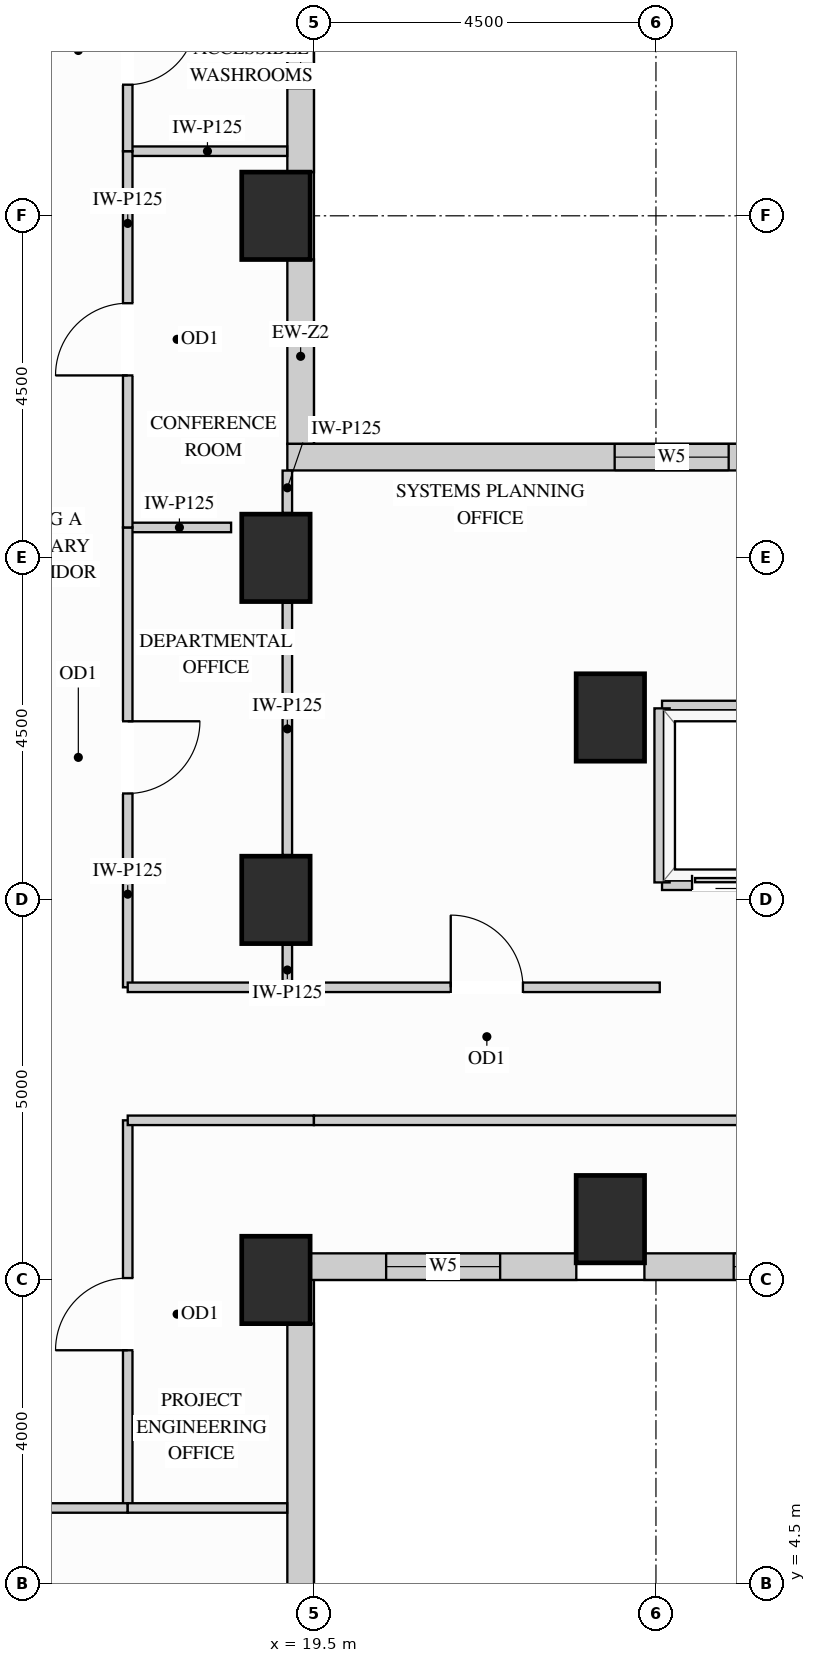
"""IFC4 building model, lengths in metres.
Left out: names, types, materials, properties, quantities, classifications, styles, units other than length and angle.
Written with IfcOpenShell. Run it as: python <this file> out.ifc"""

import sys

from ifc_helpers import new_model, si_unit, direction, frame, frame_2d, origin, origin_2d, place, context, subcontext, project, spatial, rectangle, extrude, source, transform, mapped, element, fill, save


model = new_model("IFC4")
c1 = context("Model", 3, precision=1e-05, world=origin(), true_north=direction((0.0, 1.0)))
c2 = subcontext(c1, "Body", "Model", "MODEL_VIEW")
j1 = project(units=[si_unit("LENGTHUNIT", "METRE"), si_unit("PLANEANGLEUNIT", "RADIAN")], contexts=[c1])
p1 = place(None, origin())
s1 = spatial("IfcSite", under=j1, at=p1, CompositionType="ELEMENT")
p2 = place(p1, origin())
s2 = spatial("IfcBuilding", under=s1, at=p2, CompositionType="ELEMENT")
p3 = place(p2, frame((0.0, 0.0, 131.4)))
s3 = spatial("IfcBuildingStorey", under=s2, at=p3, CompositionType="ELEMENT", Elevation=131.4)
m1 = source(origin(), c2, "Body", "SweptSolid", [
    extrude(rectangle(XDim=0.9, YDim=1.15, at=origin_2d()), origin(), (0.0, 0.0, 1.0), 3.38),
])
for number, where, z_axis, x_axis in (
    (1, (19.0, 13.5, 0.0), (0.0, 0.0, 1.0), (1.0, 0.0, 0.0)),
    (2, (19.0, 18.0, 0.0), (0.0, 0.0, 1.0), (1.0, 0.0, 0.0)),
    (3, (19.0, 22.5, 0.0), (0.0, 0.0, 1.0), (1.0, 0.0, 0.0)),
    (4, (19.0, 8.5, 0.0), (0.0, 0.0, 1.0), (1.0, 0.0, 0.0)),
    (5, (23.4, 15.9, 0.0), (0.0, 0.0, 1.0), (1.0, 0.0, 0.0)),
    (6, (23.4, 9.3, 0.0), (0.0, 0.0, 1.0), (1.0, 0.0, 0.0)),
):
    element("IfcColumn", number, at=place(p3, frame(where, z_axis=z_axis, x_axis=x_axis)), inside=s3, PredefinedType="COLUMN", context=c2, shape_type="MappedRepresentation", body=[
        mapped(m1, transform((0.0, 0.0, 0.0), x_axis=(1.0, 0.0, 0.0), y_axis=(0.0, 1.0, 0.0), z_axis=(0.0, 0.0, 1.0))),
    ])
m2 = source(origin(), c2, "Body", "SweptSolid", [
    extrude(rectangle(XDim=2.429, YDim=0.35, at=frame_2d((1.214, 0.0))), origin(), (0.0, 0.0, 1.0), 2.519),
])
p4 = place(p3, frame((19.325, 19.498, 0.0), z_axis=(0.0, 0.0, 1.0), x_axis=(0.0, 1.0, 0.0)))
e7 = element("IfcWall", 7, at=p4, inside=s3, PredefinedType="SOLIDWALL", context=c2, shape_type="MappedRepresentation", body=[
    mapped(m2, transform((0.0, 0.0, 0.0), x_axis=(1.0, 0.0, 0.0), y_axis=(0.0, 1.0, 0.0), z_axis=(0.0, 0.0, 1.0))),
])
p5 = place(p3, frame((19.325, 23.073, 0.0), z_axis=(0.0, 0.0, 1.0), x_axis=(0.0, 1.0, 0.0)))
e8 = element("IfcWall", 8, at=p5, inside=s3, PredefinedType="SOLIDWALL", context=c2, shape_type="SweptSolid", body=[
    extrude(rectangle(XDim=3.154, YDim=0.35, at=frame_2d((1.577, 0.0))), origin(), (0.0, 0.0, 1.0), 2.519),
])
p6 = place(p5, frame((1.105, 0.0, 0.78)))
e9 = element("IfcOpeningElement", 9, at=p6, cuts=e8, PredefinedType="OPENING", context=c2, shape_type="SweptSolid", body=[
    extrude(rectangle(XDim=1.5, YDim=1.559, at=frame_2d((0.75, 0.78))), frame((0.0, 0.185, 0.0), z_axis=(0.0, -1.0, 0.0), x_axis=(1.0, 0.0, 0.0)), (0.0, 0.0, 1.0), 0.37),
])
m3 = source(origin(), c2, "Body", "SweptSolid", [
    extrude(rectangle(XDim=3.854, YDim=0.35, at=frame_2d((1.927, 0.0))), origin(), (0.0, 0.0, 1.0), 2.519),
])
p7 = place(p3, frame((19.325, 4.073, 0.0), z_axis=(0.0, 0.0, 1.0), x_axis=(0.0, 1.0, 0.0)))
e10 = element("IfcWall", 10, at=p7, inside=s3, PredefinedType="SOLIDWALL", context=c2, shape_type="MappedRepresentation", body=[
    mapped(m3, transform((0.0, 0.0, 0.0), x_axis=(1.0, 0.0, 0.0), y_axis=(0.0, 1.0, 0.0), z_axis=(0.0, 0.0, 1.0))),
])
p8 = place(p3, frame((19.448, 8.675, 0.0), z_axis=(0.0, 0.0, 1.0), x_axis=(1.0, 0.0, 0.0)))
e11 = element("IfcWall", 11, at=p8, inside=s3, PredefinedType="SOLIDWALL", context=c2, shape_type="SweptSolid", body=[
    extrude(rectangle(XDim=3.504, YDim=0.35, at=frame_2d((1.752, 0.0))), origin(), (0.0, 0.0, 1.0), 3.365),
])
p9 = place(p8, frame((1.002, 0.0, 0.78)))
e12 = element("IfcOpeningElement", 12, at=p9, cuts=e11, PredefinedType="OPENING", context=c2, shape_type="SweptSolid", body=[
    extrude(rectangle(XDim=1.5, YDim=2.0, at=frame_2d((0.75, 1.0))), frame((0.0, 0.185, 0.0), z_axis=(0.0, -1.0, 0.0), x_axis=(1.0, 0.0, 0.0)), (0.0, 0.0, 1.0), 0.37),
])
p10 = place(p3, frame((23.848, 8.675, 0.0), z_axis=(0.0, 0.0, 1.0), x_axis=(1.0, 0.0, 0.0)))
e13 = element("IfcWall", 13, at=p10, inside=s3, PredefinedType="SOLIDWALL", context=c2, shape_type="SweptSolid", body=[
    extrude(rectangle(XDim=6.204, YDim=0.35, at=frame_2d((3.102, 0.0))), origin(), (0.0, 0.0, 1.0), 3.365),
])
p11 = place(p10, frame((1.175, 0.0, 0.78)))
e14 = element("IfcOpeningElement", 14, at=p11, cuts=e13, PredefinedType="OPENING", context=c2, shape_type="SweptSolid", body=[
    extrude(rectangle(XDim=1.5, YDim=2.0, at=frame_2d((0.75, 1.0))), frame((0.0, 0.185, 0.0), z_axis=(0.0, -1.0, 0.0), x_axis=(1.0, 0.0, 0.0)), (0.0, 0.0, 1.0), 0.37),
])
p12 = place(p10, frame((3.529, 0.0, 0.78)))
e15 = element("IfcOpeningElement", 15, at=p12, cuts=e13, PredefinedType="OPENING", context=c2, shape_type="SweptSolid", body=[
    extrude(rectangle(XDim=1.5, YDim=2.0, at=frame_2d((0.75, 1.0))), frame((0.0, 0.185, 0.0), z_axis=(0.0, -1.0, 0.0), x_axis=(1.0, 0.0, 0.0)), (0.0, 0.0, 1.0), 0.37),
])
p13 = place(p3, frame((34.75, 19.325, 0.0), z_axis=(0.0, 0.0, 1.0), x_axis=(-1.0, 0.0, 0.0)))
e16 = element("IfcWall", 16, at=p13, inside=s3, PredefinedType="SOLIDWALL", context=c2, shape_type="SweptSolid", body=[
    extrude(rectangle(XDim=15.6, YDim=0.35, at=frame_2d((7.8, 0.0))), origin(), (0.0, 0.0, 1.0), 3.365),
])
p14 = place(p13, frame((4.307, 0.0, 0.78)))
e17 = element("IfcOpeningElement", 17, at=p14, cuts=e16, PredefinedType="OPENING", context=c2, shape_type="SweptSolid", body=[
    extrude(rectangle(XDim=1.5, YDim=2.0, at=frame_2d((0.75, 1.0))), frame((0.0, 0.185, 0.0), z_axis=(0.0, -1.0, 0.0), x_axis=(1.0, 0.0, 0.0)), (0.0, 0.0, 1.0), 0.37),
])
p15 = place(p13, frame((9.793, 0.0, 0.78)))
e18 = element("IfcOpeningElement", 18, at=p15, cuts=e16, PredefinedType="OPENING", context=c2, shape_type="SweptSolid", body=[
    extrude(rectangle(XDim=1.5, YDim=2.0, at=frame_2d((0.75, 1.0))), frame((0.0, 0.185, 0.0), z_axis=(0.0, -1.0, 0.0), x_axis=(1.0, 0.0, 0.0)), (0.0, 0.0, 1.0), 0.37),
])
m4 = source(origin(), c2, "Body", "SweptSolid", [
    extrude(rectangle(XDim=1.36, YDim=0.125, at=frame_2d((0.68, 0.0))), origin(), (0.0, 0.0, 1.0), 3.365),
])
p16 = place(p3, frame((17.05, 18.4, 0.0), z_axis=(0.0, 0.0, 1.0), x_axis=(1.0, 0.0, 0.0)))
e19 = element("IfcWall", 19, at=p16, inside=s3, PredefinedType="PARTITIONING", context=c2, shape_type="MappedRepresentation", body=[
    mapped(m4, transform((0.0, 0.0, 0.0), x_axis=(1.0, 0.0, 0.0), y_axis=(0.0, 1.0, 0.0), z_axis=(0.0, 0.0, 1.0))),
])
m5 = source(origin(), c2, "Body", "SweptSolid", [
    extrude(rectangle(XDim=2.098, YDim=0.125, at=frame_2d((1.049, 0.0))), origin(), (0.0, 0.0, 1.0), 3.365),
])
p17 = place(p3, frame((17.05, 23.35, 0.0), z_axis=(0.0, 0.0, 1.0), x_axis=(1.0, 0.0, 0.0)))
e20 = element("IfcWall", 20, at=p17, inside=s3, PredefinedType="PARTITIONING", context=c2, shape_type="MappedRepresentation", body=[
    mapped(m5, transform((0.0, 0.0, 0.0), x_axis=(1.0, 0.0, 0.0), y_axis=(0.0, 1.0, 0.0), z_axis=(0.0, 0.0, 1.0))),
])
m6 = source(origin(), c2, "Body", "SweptSolid", [
    extrude(rectangle(XDim=0.56, YDim=0.125, at=frame_2d((0.28, 0.0))), origin(), (0.0, 0.0, 1.0), 2.677),
])
p18 = place(p3, frame((19.15, 12.35, 0.0), z_axis=(0.0, 0.0, 1.0), x_axis=(0.0, 1.0, 0.0)))
e21 = element("IfcWall", 21, at=p18, inside=s3, PredefinedType="PARTITIONING", context=c2, shape_type="MappedRepresentation", body=[
    mapped(m6, transform((0.0, 0.0, 0.0), x_axis=(1.0, 0.0, 0.0), y_axis=(0.0, 1.0, 0.0), z_axis=(0.0, 0.0, 1.0))),
])
m7 = source(origin(), c2, "Body", "SweptSolid", [
    extrude(rectangle(XDim=3.32, YDim=0.125, at=frame_2d((1.66, 0.0))), origin(), (0.0, 0.0, 1.0), 2.677),
])
p19 = place(p3, frame((19.15, 14.09, 0.0), z_axis=(0.0, 0.0, 1.0), x_axis=(0.0, 1.0, 0.0)))
e22 = element("IfcWall", 22, at=p19, inside=s3, PredefinedType="PARTITIONING", context=c2, shape_type="MappedRepresentation", body=[
    mapped(m7, transform((0.0, 0.0, 0.0), x_axis=(1.0, 0.0, 0.0), y_axis=(0.0, 1.0, 0.0), z_axis=(0.0, 0.0, 1.0))),
])
m8 = source(origin(), c2, "Body", "SweptSolid", [
    extrude(rectangle(XDim=0.558, YDim=0.125, at=frame_2d((0.279, 0.0))), origin(), (0.0, 0.0, 1.0), 2.519),
])
p20 = place(p3, frame((19.15, 18.59, 0.0), z_axis=(0.0, 0.0, 1.0), x_axis=(0.0, 1.0, 0.0)))
e23 = element("IfcWall", 23, at=p20, inside=s3, PredefinedType="PARTITIONING", context=c2, shape_type="MappedRepresentation", body=[
    mapped(m8, transform((0.0, 0.0, 0.0), x_axis=(1.0, 0.0, 0.0), y_axis=(0.0, 1.0, 0.0), z_axis=(0.0, 0.0, 1.0))),
])
p21 = place(p3, frame((17.05, 12.35, 0.0), z_axis=(0.0, 0.0, 1.0), x_axis=(0.0, 1.0, 0.0)))
e24 = element("IfcWall", 24, at=p21, inside=s3, PredefinedType="PARTITIONING", context=c2, shape_type="SweptSolid", body=[
    extrude(rectangle(XDim=6.05, YDim=0.125, at=frame_2d((3.025, 0.0))), origin(), (0.0, 0.0, 1.0), 3.365),
])
p22 = place(p21, frame((2.55, 0.0, 0.0)))
e25 = element("IfcOpeningElement", 25, at=p22, cuts=e24, PredefinedType="OPENING", context=c2, shape_type="SweptSolid", body=[
    extrude(rectangle(XDim=0.95, YDim=2.15, at=frame_2d((0.475, 1.075))), frame((0.0, 0.073, 0.0), z_axis=(0.0, -1.0, 0.0), x_axis=(1.0, 0.0, 0.0)), (0.0, 0.0, 1.0), 0.145),
])
p23 = place(p3, frame((17.05, 18.4, 0.0), z_axis=(0.0, 0.0, 1.0), x_axis=(0.0, 1.0, 0.0)))
e26 = element("IfcWall", 26, at=p23, inside=s3, PredefinedType="PARTITIONING", context=c2, shape_type="SweptSolid", body=[
    extrude(rectangle(XDim=4.95, YDim=0.125, at=frame_2d((2.475, 0.0))), origin(), (0.0, 0.0, 1.0), 3.365),
])
p24 = place(p23, frame((2.0, 0.0, 0.0)))
e27 = element("IfcOpeningElement", 27, at=p24, cuts=e26, PredefinedType="OPENING", context=c2, shape_type="SweptSolid", body=[
    extrude(rectangle(XDim=0.95, YDim=2.15, at=frame_2d((0.475, 1.075))), frame((0.0, 0.073, 0.0), z_axis=(0.0, -1.0, 0.0), x_axis=(1.0, 0.0, 0.0)), (0.0, 0.0, 1.0), 0.145),
])
p25 = place(p3, frame((17.05, 5.5, 0.0), z_axis=(0.0, 0.0, 1.0), x_axis=(0.0, 1.0, 0.0)))
e28 = element("IfcWall", 28, at=p25, inside=s3, PredefinedType="PARTITIONING", context=c2, shape_type="SweptSolid", body=[
    extrude(rectangle(XDim=5.1, YDim=0.125, at=frame_2d((2.55, 0.0))), origin(), (0.0, 0.0, 1.0), 3.365),
])
p26 = place(p25, frame((2.075, 0.0, 0.0)))
e29 = element("IfcOpeningElement", 29, at=p26, cuts=e28, PredefinedType="OPENING", context=c2, shape_type="SweptSolid", body=[
    extrude(rectangle(XDim=0.95, YDim=2.15, at=frame_2d((0.475, 1.075))), frame((0.0, 0.073, 0.0), z_axis=(0.0, -1.0, 0.0), x_axis=(1.0, 0.0, 0.0)), (0.0, 0.0, 1.0), 0.145),
])
p27 = place(p3, frame((17.05, 23.35, 0.0), z_axis=(0.0, 0.0, 1.0), x_axis=(0.0, 1.0, 0.0)))
e30 = element("IfcWall", 30, at=p27, inside=s3, PredefinedType="PARTITIONING", context=c2, shape_type="SweptSolid", body=[
    extrude(rectangle(XDim=2.7, YDim=0.125, at=frame_2d((1.35, 0.0))), origin(), (0.0, 0.0, 1.0), 3.365),
])
p28 = place(p27, frame((0.875, 0.0, 0.0)))
e31 = element("IfcOpeningElement", 31, at=p28, cuts=e30, PredefinedType="OPENING", context=c2, shape_type="SweptSolid", body=[
    extrude(rectangle(XDim=0.9, YDim=2.15, at=frame_2d((0.45, 1.075))), frame((0.0, 0.073, 0.0), z_axis=(0.0, -1.0, 0.0), x_axis=(1.0, 0.0, 0.0)), (0.0, 0.0, 1.0), 0.145),
])
m9 = source(origin(), c2, "Body", "SweptSolid", [
    extrude(rectangle(XDim=2.45, YDim=0.125, at=frame_2d((1.225, 0.0))), origin(), (0.0, 0.0, 1.0), 3.365),
])
p29 = place(p3, frame((17.05, 12.35, 0.0), z_axis=(0.0, 0.0, 1.0), x_axis=(1.0, 0.0, 0.0)))
e32 = element("IfcWall", 32, at=p29, inside=s3, PredefinedType="PARTITIONING", context=c2, shape_type="MappedRepresentation", body=[
    mapped(m9, transform((0.0, 0.0, 0.0), x_axis=(1.0, 0.0, 0.0), y_axis=(0.0, 1.0, 0.0), z_axis=(0.0, 0.0, 1.0))),
])
p30 = place(p3, frame((19.5, 12.35, 0.0), z_axis=(0.0, 0.0, 1.0), x_axis=(1.0, 0.0, 0.0)))
e33 = element("IfcWall", 33, at=p30, inside=s3, PredefinedType="PARTITIONING", context=c2, shape_type="SweptSolid", body=[
    extrude(rectangle(XDim=4.55, YDim=0.125, at=frame_2d((2.275, 0.0))), origin(), (0.0, 0.0, 1.0), 3.365),
])
p31 = place(p30, frame((1.8, 0.0, 0.0)))
e34 = element("IfcOpeningElement", 34, at=p31, cuts=e33, PredefinedType="OPENING", context=c2, shape_type="SweptSolid", body=[
    extrude(rectangle(XDim=0.95, YDim=2.15, at=frame_2d((0.475, 1.075))), frame((0.0, 0.073, 0.0), z_axis=(0.0, -1.0, 0.0), x_axis=(1.0, 0.0, 0.0)), (0.0, 0.0, 1.0), 0.145),
])
p32 = place(p3, frame((17.05, 10.6, 0.0), z_axis=(0.0, 0.0, 1.0), x_axis=(1.0, 0.0, 0.0)))
e35 = element("IfcWall", 35, at=p32, inside=s3, PredefinedType="PARTITIONING", context=c2, shape_type="MappedRepresentation", body=[
    mapped(m9, transform((0.0, 0.0, 0.0), x_axis=(1.0, 0.0, 0.0), y_axis=(0.0, 1.0, 0.0), z_axis=(0.0, 0.0, 1.0))),
])
p33 = place(p3, frame((19.5, 10.6, 0.0), z_axis=(0.0, 0.0, 1.0), x_axis=(1.0, 0.0, 0.0)))
e36 = element("IfcWall", 36, at=p33, inside=s3, PredefinedType="PARTITIONING", context=c2, shape_type="SweptSolid", body=[
    extrude(rectangle(XDim=14.9, YDim=0.125, at=frame_2d((7.45, 0.0))), origin(), (0.0, 0.0, 1.0), 3.365),
])
p34 = place(p33, frame((6.975, 0.0, 0.0)))
e37 = element("IfcOpeningElement", 37, at=p34, cuts=e36, PredefinedType="OPENING", context=c2, shape_type="SweptSolid", body=[
    extrude(rectangle(XDim=0.95, YDim=2.15, at=frame_2d((0.475, 1.075))), frame((0.0, 0.073, 0.0), z_axis=(0.0, -1.0, 0.0), x_axis=(1.0, 0.0, 0.0)), (0.0, 0.0, 1.0), 0.145),
])
p35 = place(p3, frame((13.357, 5.5, 0.0), z_axis=(0.0, 0.0, 1.0), x_axis=(1.0, 0.0, 0.0)))
e38 = element("IfcWall", 38, at=p35, inside=s3, PredefinedType="PARTITIONING", context=c2, shape_type="SweptSolid", body=[
    extrude(rectangle(XDim=3.693, YDim=0.125, at=frame_2d((1.847, 0.0))), origin(), (0.0, 0.0, 1.0), 3.365),
])
p36 = place(p35, frame((1.372, 0.0, 0.0)))
e39 = element("IfcOpeningElement", 39, at=p36, cuts=e38, PredefinedType="OPENING", context=c2, shape_type="SweptSolid", body=[
    extrude(rectangle(XDim=0.95, YDim=2.15, at=frame_2d((0.475, 1.075))), frame((0.0, 0.073, 0.0), z_axis=(0.0, -1.0, 0.0), x_axis=(1.0, 0.0, 0.0)), (0.0, 0.0, 1.0), 0.145),
])
p37 = place(p3, frame((17.05, 5.5, 0.0), z_axis=(0.0, 0.0, 1.0), x_axis=(1.0, 0.0, 0.0)))
e40 = element("IfcWall", 40, at=p37, inside=s3, PredefinedType="PARTITIONING", context=c2, shape_type="MappedRepresentation", body=[
    mapped(m5, transform((0.0, 0.0, 0.0), x_axis=(1.0, 0.0, 0.0), y_axis=(0.0, 1.0, 0.0), z_axis=(0.0, 0.0, 1.0))),
])
m10 = source(origin(), c2, "Body", "SweptSolid", [
    extrude(rectangle(XDim=1.89, YDim=0.2, at=frame_2d((0.945, 0.0))), origin(), (0.0, 0.0, 1.0), 2.677),
])
p38 = place(p3, frame((24.08, 16.02, 0.0), z_axis=(0.0, 0.0, 1.0), x_axis=(1.0, 0.0, 0.0)))
e41 = element("IfcWall", 41, at=p38, inside=s3, PredefinedType="PARTITIONING", context=c2, shape_type="MappedRepresentation", body=[
    mapped(m10, transform((0.0, 0.0, 0.0), x_axis=(1.0, 0.0, 0.0), y_axis=(0.0, 1.0, 0.0), z_axis=(0.0, 0.0, 1.0))),
])
p39 = place(p3, frame((24.08, 13.73, 0.0), z_axis=(0.0, 0.0, 1.0), x_axis=(1.0, 0.0, 0.0)))
e42 = element("IfcWall", 42, at=p39, inside=s3, PredefinedType="PARTITIONING", context=c2, shape_type="SweptSolid", body=[
    extrude(rectangle(XDim=1.89, YDim=0.2, at=frame_2d((0.945, 0.0))), origin(), (0.0, 0.0, 1.0), 2.446),
])
p40 = place(p39, frame((0.395, 0.0, 0.0)))
e43 = element("IfcOpeningElement", 43, at=p40, cuts=e42, PredefinedType="OPENING", context=c2, shape_type="SweptSolid", body=[
    extrude(rectangle(XDim=1.1, YDim=2.2, at=frame_2d((0.55, 1.1))), frame((0.0, 0.11, 0.0), z_axis=(0.0, -1.0, 0.0), x_axis=(1.0, 0.0, 0.0)), (0.0, 0.0, 1.0), 0.22),
])
m11 = source(origin(), c2, "Body", "SweptSolid", [
    extrude(rectangle(XDim=2.29, YDim=0.2, at=frame_2d((1.145, 0.0))), origin(), (0.0, 0.0, 1.0), 3.365),
])
p41 = place(p3, frame((24.08, 13.73, 0.0), z_axis=(0.0, 0.0, 1.0), x_axis=(0.0, 1.0, 0.0)))
e44 = element("IfcWall", 44, at=p41, inside=s3, PredefinedType="PARTITIONING", context=c2, shape_type="MappedRepresentation", body=[
    mapped(m11, transform((0.0, 0.0, 0.0), x_axis=(1.0, 0.0, 0.0), y_axis=(0.0, 1.0, 0.0), z_axis=(0.0, 0.0, 1.0))),
])
m12 = source(origin(), c2, "Body", "SweptSolid", [
    extrude(rectangle(XDim=1.1, YDim=2.2, at=frame_2d((0.55, 1.1))), frame((0.0, 0.025, 0.0), z_axis=(0.0, -1.0, 0.0), x_axis=(1.0, 0.0, 0.0)), (0.0, 0.0, 1.0), 0.05),
])
p42 = place(p40, origin())
e45 = element("IfcDoor", 45, at=p42, inside=s3, OperationType="SLIDING_TO_LEFT", PredefinedType="DOOR", context=c2, shape_type="MappedRepresentation", body=[
    mapped(m12, transform((0.0, 0.0, 0.0), x_axis=(1.0, 0.0, 0.0), y_axis=(0.0, 1.0, 0.0), z_axis=(0.0, 0.0, 1.0))),
])
fill(e43, e45)
m13 = source(origin(), c2, "Body", "SweptSolid", [
    extrude(rectangle(XDim=0.95, YDim=2.15, at=frame_2d((0.475, 1.075))), frame((0.0, 0.025, 0.0), z_axis=(0.0, -1.0, 0.0), x_axis=(1.0, 0.0, 0.0)), (0.0, 0.0, 1.0), 0.05),
])
p43 = place(p26, origin())
e46 = element("IfcDoor", 46, at=p43, inside=s3, OperationType="SINGLE_SWING_LEFT", PredefinedType="DOOR", context=c2, shape_type="MappedRepresentation", body=[
    mapped(m13, transform((0.0, 0.0, 0.0), x_axis=(1.0, 0.0, 0.0), y_axis=(0.0, 1.0, 0.0), z_axis=(0.0, 0.0, 1.0))),
])
fill(e29, e46)
p44 = place(p22, origin())
e47 = element("IfcDoor", 47, at=p44, inside=s3, OperationType="SINGLE_SWING_RIGHT", PredefinedType="DOOR", context=c2, shape_type="MappedRepresentation", body=[
    mapped(m13, transform((0.0, 0.0, 0.0), x_axis=(1.0, 0.0, 0.0), y_axis=(0.0, 1.0, 0.0), z_axis=(0.0, 0.0, 1.0))),
])
fill(e25, e47)
p45 = place(p24, origin())
e48 = element("IfcDoor", 48, at=p45, inside=s3, OperationType="SINGLE_SWING_LEFT", PredefinedType="DOOR", context=c2, shape_type="MappedRepresentation", body=[
    mapped(m13, transform((0.0, 0.0, 0.0), x_axis=(1.0, 0.0, 0.0), y_axis=(0.0, 1.0, 0.0), z_axis=(0.0, 0.0, 1.0))),
])
fill(e27, e48)
p46 = place(p31, origin())
e49 = element("IfcDoor", 49, at=p46, inside=s3, OperationType="SINGLE_SWING_LEFT", PredefinedType="DOOR", context=c2, shape_type="MappedRepresentation", body=[
    mapped(m13, transform((0.0, 0.0, 0.0), x_axis=(1.0, 0.0, 0.0), y_axis=(0.0, 1.0, 0.0), z_axis=(0.0, 0.0, 1.0))),
])
fill(e34, e49)
m14 = source(origin(), c2, "Body", "SweptSolid", [
    extrude(rectangle(XDim=0.9, YDim=2.15, at=frame_2d((0.45, 1.075))), frame((0.0, 0.025, 0.0), z_axis=(0.0, -1.0, 0.0), x_axis=(1.0, 0.0, 0.0)), (0.0, 0.0, 1.0), 0.05),
])
p47 = place(p28, origin())
e50 = element("IfcDoor", 50, at=p47, inside=s3, OperationType="SINGLE_SWING_RIGHT", PredefinedType="DOOR", context=c2, shape_type="MappedRepresentation", body=[
    mapped(m14, transform((0.0, 0.0, 0.0), x_axis=(1.0, 0.0, 0.0), y_axis=(0.0, 1.0, 0.0), z_axis=(0.0, 0.0, 1.0))),
])
fill(e31, e50)
m15 = source(origin(), c2, "Body", "SweptSolid", [
    extrude(rectangle(XDim=1.5, YDim=1.559, at=frame_2d((0.75, 0.78))), frame((0.0, 0.03, 0.0), z_axis=(0.0, -1.0, 0.0), x_axis=(1.0, 0.0, 0.0)), (0.0, 0.0, 1.0), 0.06),
])
p48 = place(p6, origin())
e51 = element("IfcWindow", 51, at=p48, inside=s3, PartitioningType="SINGLE_PANEL", PredefinedType="WINDOW", context=c2, shape_type="MappedRepresentation", body=[
    mapped(m15, transform((0.0, 0.0, 0.0), x_axis=(1.0, 0.0, 0.0), y_axis=(0.0, 1.0, 0.0), z_axis=(0.0, 0.0, 1.0))),
])
fill(e9, e51)
m16 = source(origin(), c2, "Body", "SweptSolid", [
    extrude(rectangle(XDim=1.5, YDim=2.0, at=frame_2d((0.75, 1.0))), frame((0.0, 0.03, 0.0), z_axis=(0.0, -1.0, 0.0), x_axis=(1.0, 0.0, 0.0)), (0.0, 0.0, 1.0), 0.06),
])
p49 = place(p9, origin())
e52 = element("IfcWindow", 52, at=p49, inside=s3, PartitioningType="SINGLE_PANEL", PredefinedType="WINDOW", context=c2, shape_type="MappedRepresentation", body=[
    mapped(m16, transform((0.0, 0.0, 0.0), x_axis=(1.0, 0.0, 0.0), y_axis=(0.0, 1.0, 0.0), z_axis=(0.0, 0.0, 1.0))),
])
fill(e12, e52)
p50 = place(p11, origin())
e53 = element("IfcWindow", 53, at=p50, inside=s3, PartitioningType="SINGLE_PANEL", PredefinedType="WINDOW", context=c2, shape_type="MappedRepresentation", body=[
    mapped(m16, transform((0.0, 0.0, 0.0), x_axis=(1.0, 0.0, 0.0), y_axis=(0.0, 1.0, 0.0), z_axis=(0.0, 0.0, 1.0))),
])
fill(e14, e53)
p51 = place(p15, origin())
e54 = element("IfcWindow", 54, at=p51, inside=s3, PartitioningType="SINGLE_PANEL", PredefinedType="WINDOW", context=c2, shape_type="MappedRepresentation", body=[
    mapped(m16, transform((0.0, 0.0, 0.0), x_axis=(1.0, 0.0, 0.0), y_axis=(0.0, 1.0, 0.0), z_axis=(0.0, 0.0, 1.0))),
])
fill(e18, e54)
save(model, sys.argv[1])
